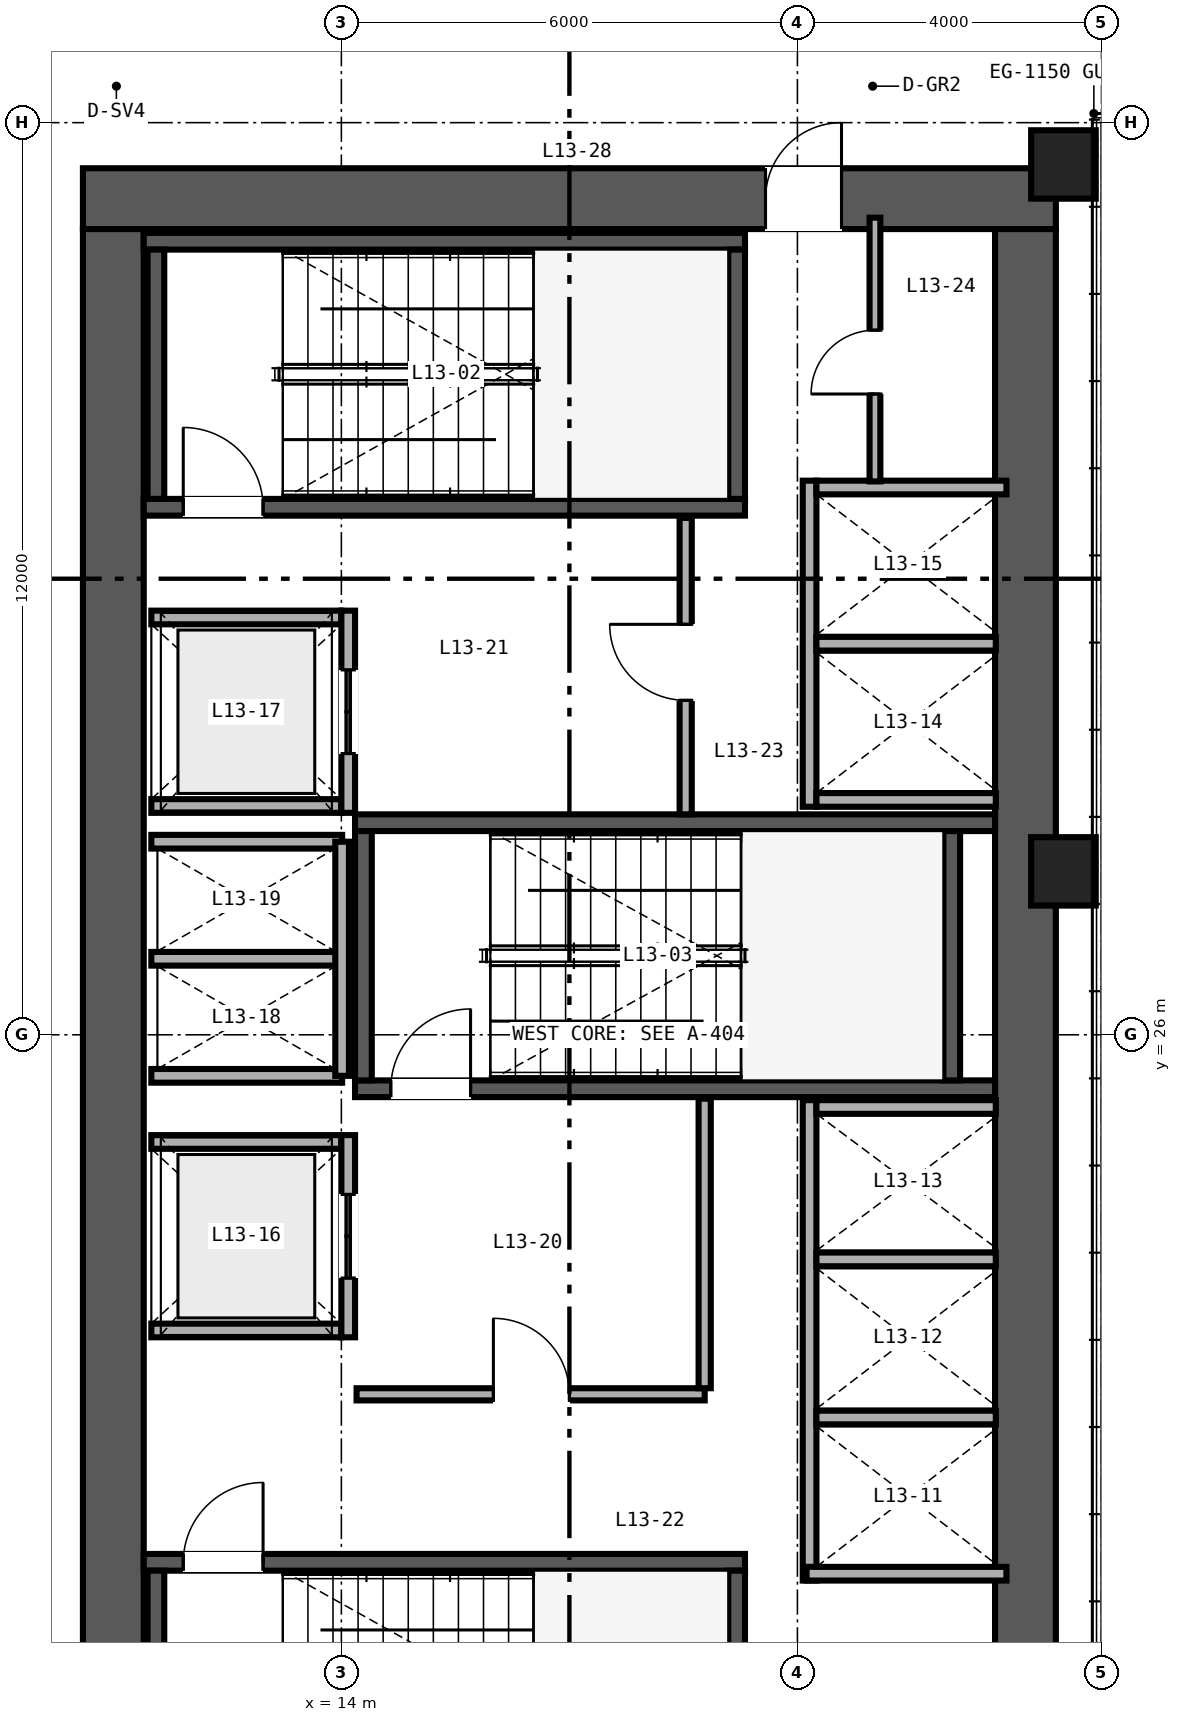
"""IFC4 building model, lengths in metres.
Left out: names, types, materials, properties, quantities, classifications, styles, units other than length and angle.
Written with IfcOpenShell. Run it as: python <this file> out.ifc"""

import sys

from ifc_helpers import new_model, si_unit, direction, frame, frame_2d, origin, origin_2d, place, context, subcontext, project, spatial, rectangle, hollow_rectangle, extrude, source, transform, mapped, element, fill, save


model = new_model("IFC4")
c1 = context("Model", 3, precision=1e-05, world=origin(), true_north=direction((0.0, 1.0)))
c2 = subcontext(c1, "Body", "Model", "MODEL_VIEW")
j1 = project(units=[si_unit("LENGTHUNIT", "METRE"), si_unit("PLANEANGLEUNIT", "RADIAN")], contexts=[c1])
p1 = place(None, origin())
s1 = spatial("IfcSite", under=j1, at=p1, CompositionType="ELEMENT")
p2 = place(p1, origin())
s2 = spatial("IfcBuilding", under=s1, at=p2, CompositionType="ELEMENT")
p3 = place(p2, frame((0.0, 0.0, 56.4)))
s3 = spatial("IfcBuildingStorey", under=s2, at=p3, CompositionType="ELEMENT", Elevation=56.4)
p4 = place(p3, frame((10.6, 37.0, 0.0), z_axis=(0.0, 0.0, 1.0), x_axis=(1.0, 0.0, 0.0)))
e1 = element("IfcWall", 1, at=p4, inside=s3, PredefinedType="SHEAR", context=c2, shape_type="SweptSolid", body=[
    extrude(rectangle(XDim=12.8, YDim=0.8, at=frame_2d((6.4, 0.0))), origin(), (0.0, 0.0, 1.0), 3.35),
])
p5 = place(p4, frame((8.98, 0.0, 0.0)))
e2 = element("IfcOpeningElement", 2, at=p5, cuts=e1, PredefinedType="OPENING", context=c2, shape_type="SweptSolid", body=[
    extrude(rectangle(XDim=1.0, YDim=2.15, at=frame_2d((0.5, 1.075))), frame((0.0, 0.41, 0.0), z_axis=(0.0, -1.0, 0.0), x_axis=(1.0, 0.0, 0.0)), (0.0, 0.0, 1.0), 0.82),
])
for number, where, z_axis, x_axis in (
    (3, (11.0, 15.4, 0.0), (0.0, 0.0, 1.0), (0.0, 1.0, 0.0)),
    (4, (23.0, 15.4, 0.0), (0.0, 0.0, 1.0), (0.0, 1.0, 0.0)),
):
    element("IfcWall", number, at=place(p3, frame(where, z_axis=z_axis, x_axis=x_axis)), inside=s3, PredefinedType="SHEAR", context=c2, shape_type="SweptSolid", body=[
        extrude(rectangle(XDim=21.2, YDim=0.8, at=frame_2d((10.6, 0.0))), origin(), (0.0, 0.0, 1.0), 3.35),
    ])
p6 = place(p3, frame((11.4, 19.06, 0.0), z_axis=(0.0, 0.0, 1.0), x_axis=(1.0, 0.0, 0.0)))
e5 = element("IfcWall", 5, at=p6, inside=s3, PredefinedType="SHEAR", context=c2, shape_type="SweptSolid", body=[
    extrude(rectangle(XDim=7.91, YDim=0.22, at=frame_2d((3.955, 0.0))), origin(), (0.0, 0.0, 1.0), 3.4),
])
p7 = place(p6, frame((0.52, 0.0, 0.0)))
e6 = element("IfcOpeningElement", 6, at=p7, cuts=e5, PredefinedType="OPENING", context=c2, shape_type="SweptSolid", body=[
    extrude(rectangle(XDim=1.05, YDim=2.15, at=frame_2d((0.525, 1.075))), frame((0.0, 0.12, 0.0), z_axis=(0.0, -1.0, 0.0), x_axis=(1.0, 0.0, 0.0)), (0.0, 0.0, 1.0), 0.24),
])
for number, where, z_axis, x_axis in (
    (7, (11.56, 15.67, 0.0), (0.0, 0.0, 1.0), (0.0, 1.0, 0.0)),
    (8, (19.2, 15.67, 0.0), (0.0, 0.0, 1.0), (0.0, 1.0, 0.0)),
):
    element("IfcWall", number, at=place(p3, frame(where, z_axis=z_axis, x_axis=x_axis)), inside=s3, PredefinedType="SHEAR", context=c2, shape_type="SweptSolid", body=[
        extrude(rectangle(XDim=3.28, YDim=0.22, at=frame_2d((1.64, 0.0))), origin(), (0.0, 0.0, 1.0), 3.4),
    ])
p8 = place(p3, frame((11.4, 32.94, 0.0), z_axis=(0.0, 0.0, 1.0), x_axis=(1.0, 0.0, 0.0)))
e9 = element("IfcWall", 9, at=p8, inside=s3, PredefinedType="SHEAR", context=c2, shape_type="SweptSolid", body=[
    extrude(rectangle(XDim=7.91, YDim=0.22, at=frame_2d((3.955, 0.0))), origin(), (0.0, 0.0, 1.0), 3.4),
])
p9 = place(p8, frame((0.52, 0.0, 0.0)))
e10 = element("IfcOpeningElement", 10, at=p9, cuts=e9, PredefinedType="OPENING", context=c2, shape_type="SweptSolid", body=[
    extrude(rectangle(XDim=1.05, YDim=2.15, at=frame_2d((0.525, 1.075))), frame((0.0, 0.12, 0.0), z_axis=(0.0, -1.0, 0.0), x_axis=(1.0, 0.0, 0.0)), (0.0, 0.0, 1.0), 0.24),
])
p10 = place(p3, frame((11.4, 36.44, 0.0), z_axis=(0.0, 0.0, 1.0), x_axis=(1.0, 0.0, 0.0)))
e11 = element("IfcWall", 11, at=p10, inside=s3, PredefinedType="SHEAR", context=c2, shape_type="SweptSolid", body=[
    extrude(rectangle(XDim=7.91, YDim=0.22, at=frame_2d((3.955, 0.0))), origin(), (0.0, 0.0, 1.0), 3.4),
])
for number, where, z_axis, x_axis in (
    (12, (11.56, 33.05, 0.0), (0.0, 0.0, 1.0), (0.0, 1.0, 0.0)),
    (13, (19.2, 33.05, 0.0), (0.0, 0.0, 1.0), (0.0, 1.0, 0.0)),
):
    element("IfcWall", number, at=place(p3, frame(where, z_axis=z_axis, x_axis=x_axis)), inside=s3, PredefinedType="SHEAR", context=c2, shape_type="SweptSolid", body=[
        extrude(rectangle(XDim=3.28, YDim=0.22, at=frame_2d((1.64, 0.0))), origin(), (0.0, 0.0, 1.0), 3.4),
    ])
p11 = place(p3, frame((14.18, 25.29, 0.0), z_axis=(0.0, 0.0, 1.0), x_axis=(1.0, 0.0, 0.0)))
e14 = element("IfcWall", 14, at=p11, inside=s3, PredefinedType="SHEAR", context=c2, shape_type="SweptSolid", body=[
    extrude(rectangle(XDim=8.42, YDim=0.22, at=frame_2d((4.21, 0.0))), origin(), (0.0, 0.0, 1.0), 3.4),
])
p12 = place(p11, frame((0.47, 0.0, 0.0)))
e15 = element("IfcOpeningElement", 15, at=p12, cuts=e14, PredefinedType="OPENING", context=c2, shape_type="SweptSolid", body=[
    extrude(rectangle(XDim=1.05, YDim=2.15, at=frame_2d((0.525, 1.075))), frame((0.0, 0.12, 0.0), z_axis=(0.0, -1.0, 0.0), x_axis=(1.0, 0.0, 0.0)), (0.0, 0.0, 1.0), 0.24),
])
p13 = place(p3, frame((14.18, 28.79, 0.0), z_axis=(0.0, 0.0, 1.0), x_axis=(1.0, 0.0, 0.0)))
e16 = element("IfcWall", 16, at=p13, inside=s3, PredefinedType="SHEAR", context=c2, shape_type="SweptSolid", body=[
    extrude(rectangle(XDim=8.42, YDim=0.22, at=frame_2d((4.21, 0.0))), origin(), (0.0, 0.0, 1.0), 3.4),
])
for number, where, z_axis, x_axis in (
    (17, (14.29, 25.4, 0.0), (0.0, 0.0, 1.0), (0.0, 1.0, 0.0)),
    (18, (22.03, 25.4, 0.0), (0.0, 0.0, 1.0), (0.0, 1.0, 0.0)),
):
    element("IfcWall", number, at=place(p3, frame(where, z_axis=z_axis, x_axis=x_axis)), inside=s3, PredefinedType="SHEAR", context=c2, shape_type="SweptSolid", body=[
        extrude(rectangle(XDim=3.28, YDim=0.22, at=frame_2d((1.64, 0.0))), origin(), (0.0, 0.0, 1.0), 3.4),
    ])
m1 = source(origin(), c2, "Body", "SweptSolid", [
    extrude(hollow_rectangle(XDim=0.85, YDim=0.9, WallThickness=0.04, at=origin_2d()), origin(), (0.0, 0.0, 1.0), 3.35),
])
for number, where, z_axis, x_axis in (
    (19, (23.5, 28.15, 0.0), (0.0, 0.0, 1.0), (1.0, 0.0, 0.0)),
    (20, (23.5, 37.45, 0.0), (0.0, 0.0, 1.0), (1.0, 0.0, 0.0)),
):
    element("IfcColumn", number, at=place(p3, frame(where, z_axis=z_axis, x_axis=x_axis)), inside=s3, PredefinedType="COLUMN", context=c2, shape_type="MappedRepresentation", body=[
        mapped(m1, transform((0.0, 0.0, 0.0), scale=1.0)),
    ])
p14 = place(p3, frame((20.16, 18.82, 0.0), z_axis=(0.0, 0.0, 1.0), x_axis=(0.0, 1.0, 0.0)))
e21 = element("IfcWall", 21, at=p14, inside=s3, PredefinedType="SOLIDWALL", context=c2, shape_type="SweptSolid", body=[
    extrude(rectangle(XDim=6.32, YDim=0.18, at=frame_2d((3.16, 0.0))), origin(), (0.0, 0.0, 1.0), 2.36),
])
p15 = place(p3, frame((20.12, 18.91, 0.0), z_axis=(0.0, 0.0, 1.0), x_axis=(1.0, 0.0, 0.0)))
e22 = element("IfcWall", 22, at=p15, inside=s3, PredefinedType="SOLIDWALL", context=c2, shape_type="SweptSolid", body=[
    extrude(rectangle(XDim=2.63, YDim=0.18, at=frame_2d((1.315, 0.0))), origin(), (0.0, 0.0, 1.0), 3.35),
])
p16 = place(p3, frame((20.25, 25.05, 0.0), z_axis=(0.0, 0.0, 1.0), x_axis=(1.0, 0.0, 0.0)))
e23 = element("IfcWall", 23, at=p16, inside=s3, PredefinedType="SOLIDWALL", context=c2, shape_type="SweptSolid", body=[
    extrude(rectangle(XDim=2.36, YDim=0.18, at=frame_2d((1.18, 0.0))), origin(), (0.0, 0.0, 1.0), 3.35),
])
p17 = place(p3, frame((20.25, 20.965, 0.0), z_axis=(0.0, 0.0, 1.0), x_axis=(1.0, 0.0, 0.0)))
e24 = element("IfcWall", 24, at=p17, inside=s3, PredefinedType="SOLIDWALL", context=c2, shape_type="SweptSolid", body=[
    extrude(rectangle(XDim=2.36, YDim=0.18, at=frame_2d((1.18, 0.0))), origin(), (0.0, 0.0, 1.0), 2.36),
])
p18 = place(p3, frame((20.25, 23.045, 0.0), z_axis=(0.0, 0.0, 1.0), x_axis=(1.0, 0.0, 0.0)))
e25 = element("IfcWall", 25, at=p18, inside=s3, PredefinedType="SOLIDWALL", context=c2, shape_type="SweptSolid", body=[
    extrude(rectangle(XDim=2.36, YDim=0.18, at=frame_2d((1.18, 0.0))), origin(), (0.0, 0.0, 1.0), 3.35),
])
p19 = place(p3, frame((20.16, 29.0, 0.0), z_axis=(0.0, 0.0, 1.0), x_axis=(0.0, 1.0, 0.0)))
e26 = element("IfcWall", 26, at=p19, inside=s3, PredefinedType="SOLIDWALL", context=c2, shape_type="SweptSolid", body=[
    extrude(rectangle(XDim=4.29, YDim=0.18, at=frame_2d((2.145, 0.0))), origin(), (0.0, 0.0, 1.0), 3.35),
])
p20 = place(p3, frame((20.25, 29.09, 0.0), z_axis=(0.0, 0.0, 1.0), x_axis=(1.0, 0.0, 0.0)))
e27 = element("IfcWall", 27, at=p20, inside=s3, PredefinedType="SOLIDWALL", context=c2, shape_type="SweptSolid", body=[
    extrude(rectangle(XDim=2.36, YDim=0.18, at=frame_2d((1.18, 0.0))), origin(), (0.0, 0.0, 1.0), 3.35),
])
p21 = place(p3, frame((20.25, 33.2, 0.0), z_axis=(0.0, 0.0, 1.0), x_axis=(1.0, 0.0, 0.0)))
e28 = element("IfcWall", 28, at=p21, inside=s3, PredefinedType="SOLIDWALL", context=c2, shape_type="SweptSolid", body=[
    extrude(rectangle(XDim=2.5, YDim=0.18, at=frame_2d((1.25, 0.0))), origin(), (0.0, 0.0, 1.0), 3.35),
])
p22 = place(p3, frame((20.25, 31.145, 0.0), z_axis=(0.0, 0.0, 1.0), x_axis=(1.0, 0.0, 0.0)))
e29 = element("IfcWall", 29, at=p22, inside=s3, PredefinedType="SOLIDWALL", context=c2, shape_type="SweptSolid", body=[
    extrude(rectangle(XDim=2.36, YDim=0.18, at=frame_2d((1.18, 0.0))), origin(), (0.0, 0.0, 1.0), 3.35),
])
for number, where, z_axis, x_axis in (
    (30, (11.5, 22.11, 0.0), (0.0, 0.0, 1.0), (1.0, 0.0, 0.0)),
    (31, (11.5, 24.59, 0.0), (0.0, 0.0, 1.0), (1.0, 0.0, 0.0)),
):
    element("IfcWall", number, at=place(p3, frame(where, z_axis=z_axis, x_axis=x_axis)), inside=s3, PredefinedType="SOLIDWALL", context=c2, shape_type="SweptSolid", body=[
        extrude(rectangle(XDim=2.5, YDim=0.18, at=frame_2d((1.25, 0.0))), origin(), (0.0, 0.0, 1.0), 3.35),
    ])
p23 = place(p3, frame((14.09, 22.02, 0.0), z_axis=(0.0, 0.0, 1.0), x_axis=(0.0, 1.0, 0.0)))
e32 = element("IfcWall", 32, at=p23, inside=s3, PredefinedType="SOLIDWALL", context=c2, shape_type="SweptSolid", body=[
    extrude(rectangle(XDim=2.66, YDim=0.18, at=frame_2d((1.33, 0.0))), origin(), (0.0, 0.0, 1.0), 3.35),
])
p24 = place(p23, frame((0.78, 0.0, 0.0)))
e33 = element("IfcOpeningElement", 33, at=p24, cuts=e32, PredefinedType="OPENING", context=c2, shape_type="SweptSolid", body=[
    extrude(rectangle(XDim=1.1, YDim=2.2, at=frame_2d((0.55, 1.1))), frame((0.0, 0.1, 0.0), z_axis=(0.0, -1.0, 0.0), x_axis=(1.0, 0.0, 0.0)), (0.0, 0.0, 1.0), 0.2),
])
for number, where, z_axis, x_axis in (
    (34, (11.5, 29.01, 0.0), (0.0, 0.0, 1.0), (1.0, 0.0, 0.0)),
    (35, (11.5, 31.49, 0.0), (0.0, 0.0, 1.0), (1.0, 0.0, 0.0)),
):
    element("IfcWall", number, at=place(p3, frame(where, z_axis=z_axis, x_axis=x_axis)), inside=s3, PredefinedType="SOLIDWALL", context=c2, shape_type="SweptSolid", body=[
        extrude(rectangle(XDim=2.5, YDim=0.18, at=frame_2d((1.25, 0.0))), origin(), (0.0, 0.0, 1.0), 3.35),
    ])
p25 = place(p3, frame((14.09, 28.92, 0.0), z_axis=(0.0, 0.0, 1.0), x_axis=(0.0, 1.0, 0.0)))
e36 = element("IfcWall", 36, at=p25, inside=s3, PredefinedType="SOLIDWALL", context=c2, shape_type="SweptSolid", body=[
    extrude(rectangle(XDim=2.66, YDim=0.18, at=frame_2d((1.33, 0.0))), origin(), (0.0, 0.0, 1.0), 3.35),
])
p26 = place(p25, frame((0.78, 0.0, 0.0)))
e37 = element("IfcOpeningElement", 37, at=p26, cuts=e36, PredefinedType="OPENING", context=c2, shape_type="SweptSolid", body=[
    extrude(rectangle(XDim=1.1, YDim=2.2, at=frame_2d((0.55, 1.1))), frame((0.0, 0.1, 0.0), z_axis=(0.0, -1.0, 0.0), x_axis=(1.0, 0.0, 0.0)), (0.0, 0.0, 1.0), 0.2),
])
for number, where, z_axis, x_axis in (
    (38, (11.5, 25.46, 0.0), (0.0, 0.0, 1.0), (1.0, 0.0, 0.0)),
    (39, (11.5, 27.0, 0.0), (0.0, 0.0, 1.0), (1.0, 0.0, 0.0)),
    (40, (11.5, 28.54, 0.0), (0.0, 0.0, 1.0), (1.0, 0.0, 0.0)),
):
    element("IfcWall", number, at=place(p3, frame(where, z_axis=z_axis, x_axis=x_axis)), inside=s3, PredefinedType="SOLIDWALL", context=c2, shape_type="SweptSolid", body=[
        extrude(rectangle(XDim=2.51, YDim=0.18, at=frame_2d((1.255, 0.0))), origin(), (0.0, 0.0, 1.0), 3.35),
    ])
p27 = place(p3, frame((14.01, 25.46, 0.0), z_axis=(0.0, 0.0, 1.0), x_axis=(0.0, 1.0, 0.0)))
e41 = element("IfcWall", 41, at=p27, inside=s3, PredefinedType="SOLIDWALL", context=c2, shape_type="SweptSolid", body=[
    extrude(rectangle(XDim=3.08, YDim=0.18, at=frame_2d((1.54, 0.0))), origin(), (0.0, 0.0, 1.0), 3.35),
])
p28 = place(p3, frame((14.2, 21.27, 0.0), z_axis=(0.0, 0.0, 1.0), x_axis=(1.0, 0.0, 0.0)))
e42 = element("IfcWall", 42, at=p28, inside=s3, PredefinedType="PARTITIONING", context=c2, shape_type="SweptSolid", body=[
    extrude(rectangle(XDim=4.58, YDim=0.16, at=frame_2d((2.29, 0.0))), origin(), (0.0, 0.0, 1.0), 3.35),
])
p29 = place(p28, frame((1.8, 0.0, 0.0)))
e43 = element("IfcOpeningElement", 43, at=p29, cuts=e42, PredefinedType="OPENING", context=c2, shape_type="SweptSolid", body=[
    extrude(rectangle(XDim=1.0, YDim=2.15, at=frame_2d((0.5, 1.075))), frame((0.0, 0.09, 0.0), z_axis=(0.0, -1.0, 0.0), x_axis=(1.0, 0.0, 0.0)), (0.0, 0.0, 1.0), 0.18),
])
p30 = place(p3, frame((18.78, 21.35, 0.0), z_axis=(0.0, 0.0, 1.0), x_axis=(0.0, 1.0, 0.0)))
e44 = element("IfcWall", 44, at=p30, inside=s3, PredefinedType="PARTITIONING", context=c2, shape_type="SweptSolid", body=[
    extrude(rectangle(XDim=3.81, YDim=0.16, at=frame_2d((1.905, 0.0))), origin(), (0.0, 0.0, 1.0), 3.35),
])
p31 = place(p3, frame((18.53, 28.9, 0.0), z_axis=(0.0, 0.0, 1.0), x_axis=(0.0, 1.0, 0.0)))
e45 = element("IfcWall", 45, at=p31, inside=s3, PredefinedType="PARTITIONING", context=c2, shape_type="SweptSolid", body=[
    extrude(rectangle(XDim=3.9, YDim=0.16, at=frame_2d((1.95, 0.0))), origin(), (0.0, 0.0, 1.0), 3.35),
])
p32 = place(p31, frame((1.5, 0.0, 0.0)))
e46 = element("IfcOpeningElement", 46, at=p32, cuts=e45, PredefinedType="OPENING", context=c2, shape_type="SweptSolid", body=[
    extrude(rectangle(XDim=1.0, YDim=2.15, at=frame_2d((0.5, 1.075))), frame((0.0, 0.09, 0.0), z_axis=(0.0, -1.0, 0.0), x_axis=(1.0, 0.0, 0.0)), (0.0, 0.0, 1.0), 0.18),
])
p33 = place(p3, frame((21.02, 33.28, 0.0), z_axis=(0.0, 0.0, 1.0), x_axis=(0.0, 1.0, 0.0)))
e47 = element("IfcWall", 47, at=p33, inside=s3, PredefinedType="PARTITIONING", context=c2, shape_type="SweptSolid", body=[
    extrude(rectangle(XDim=3.47, YDim=0.142, at=frame_2d((1.735, 0.0))), origin(), (0.0, 0.0, 1.0), 3.35),
])
p34 = place(p33, frame((1.15, 0.0, 0.0)))
e48 = element("IfcOpeningElement", 48, at=p34, cuts=e47, PredefinedType="OPENING", context=c2, shape_type="SweptSolid", body=[
    extrude(rectangle(XDim=0.84, YDim=2.1, at=frame_2d((0.42, 1.05))), frame((0.0, 0.081, 0.0), z_axis=(0.0, -1.0, 0.0), x_axis=(1.0, 0.0, 0.0)), (0.0, 0.0, 1.0), 0.162),
])
m2 = source(origin(), c2, "Body", "SweptSolid", [
    extrude(rectangle(XDim=1.05, YDim=2.15, at=frame_2d((0.525, 1.075))), frame((0.0, 0.025, 0.0), z_axis=(0.0, -1.0, 0.0), x_axis=(1.0, 0.0, 0.0)), (0.0, 0.0, 1.0), 0.05),
])
p35 = place(p7, origin())
e49 = element("IfcDoor", 49, at=p35, inside=s3, OperationType="SINGLE_SWING_RIGHT", PredefinedType="DOOR", context=c2, shape_type="MappedRepresentation", body=[
    mapped(m2, transform((0.0, 0.0, 0.0), scale=1.0)),
])
fill(e6, e49)
p36 = place(p9, origin())
e50 = element("IfcDoor", 50, at=p36, inside=s3, OperationType="SINGLE_SWING_LEFT", PredefinedType="DOOR", context=c2, shape_type="MappedRepresentation", body=[
    mapped(m2, transform((0.0, 0.0, 0.0), scale=1.0)),
])
fill(e10, e50)
p37 = place(p12, origin())
e51 = element("IfcDoor", 51, at=p37, inside=s3, OperationType="SINGLE_SWING_RIGHT", PredefinedType="DOOR", context=c2, shape_type="MappedRepresentation", body=[
    mapped(m2, transform((0.0, 0.0, 0.0), scale=1.0)),
])
fill(e15, e51)
m3 = source(origin(), c2, "Body", "SweptSolid", [
    extrude(rectangle(XDim=1.1, YDim=2.2, at=frame_2d((0.55, 1.1))), frame((0.0, 0.025, 0.0), z_axis=(0.0, -1.0, 0.0), x_axis=(1.0, 0.0, 0.0)), (0.0, 0.0, 1.0), 0.05),
])
p38 = place(p24, origin())
e52 = element("IfcDoor", 52, at=p38, inside=s3, OperationType="DOUBLE_DOOR_SLIDING", PredefinedType="DOOR", context=c2, shape_type="MappedRepresentation", body=[
    mapped(m3, transform((0.0, 0.0, 0.0), scale=1.0)),
])
fill(e33, e52)
p39 = place(p26, origin())
e53 = element("IfcDoor", 53, at=p39, inside=s3, OperationType="DOUBLE_DOOR_SLIDING", PredefinedType="DOOR", context=c2, shape_type="MappedRepresentation", body=[
    mapped(m3, transform((0.0, 0.0, 0.0), scale=1.0)),
])
fill(e37, e53)
m4 = source(origin(), c2, "Body", "SweptSolid", [
    extrude(rectangle(XDim=1.0, YDim=2.15, at=frame_2d((0.5, 1.075))), frame((0.0, 0.025, 0.0), z_axis=(0.0, -1.0, 0.0), x_axis=(1.0, 0.0, 0.0)), (0.0, 0.0, 1.0), 0.05),
])
p40 = place(p29, origin())
e54 = element("IfcDoor", 54, at=p40, inside=s3, OperationType="SINGLE_SWING_LEFT", PredefinedType="DOOR", context=c2, shape_type="MappedRepresentation", body=[
    mapped(m4, transform((0.0, 0.0, 0.0), scale=1.0)),
])
fill(e43, e54)
p41 = place(p32, origin())
e55 = element("IfcDoor", 55, at=p41, inside=s3, OperationType="SINGLE_SWING_RIGHT", PredefinedType="DOOR", context=c2, shape_type="MappedRepresentation", body=[
    mapped(m4, transform((0.0, 0.0, 0.0), scale=1.0)),
])
fill(e46, e55)
m5 = source(origin(), c2, "Body", "SweptSolid", [
    extrude(rectangle(XDim=0.84, YDim=2.1, at=frame_2d((0.42, 1.05))), frame((0.0, 0.025, 0.0), z_axis=(0.0, -1.0, 0.0), x_axis=(1.0, 0.0, 0.0)), (0.0, 0.0, 1.0), 0.05),
])
p42 = place(p34, origin())
e56 = element("IfcDoor", 56, at=p42, inside=s3, OperationType="SINGLE_SWING_LEFT", PredefinedType="DOOR", context=c2, shape_type="MappedRepresentation", body=[
    mapped(m5, transform((0.0, 0.0, 0.0), scale=1.0)),
])
fill(e48, e56)
p43 = place(p5, origin())
e57 = element("IfcDoor", 57, at=p43, inside=s3, OperationType="SINGLE_SWING_RIGHT", PredefinedType="DOOR", context=c2, shape_type="MappedRepresentation", body=[
    mapped(m4, transform((0.0, 0.0, 0.0), scale=1.0)),
])
fill(e2, e57)
save(model, sys.argv[1])
